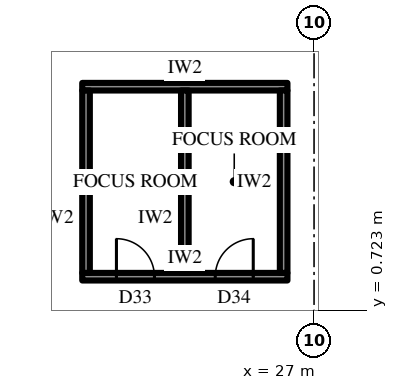
"""IFC4 building model, lengths in metres.
Left out: names, types, materials, properties, quantities, classifications, styles, units other than length and angle.
Written with IfcOpenShell. Run it as: python <this file> out.ifc"""

import sys

from ifc_helpers import new_model, si_unit, direction, frame, frame_2d, origin, place, context, subcontext, project, spatial, rectangle, extrude, element, fill, save


model = new_model("IFC4")
c1 = context("Model", 3, precision=1e-05, world=origin(), true_north=direction((0.0, 1.0)))
c2 = subcontext(c1, "Body", "Model", "MODEL_VIEW")
j1 = project(units=[si_unit("LENGTHUNIT", "METRE"), si_unit("PLANEANGLEUNIT", "RADIAN")], contexts=[c1])
p1 = place(None, origin())
s1 = spatial("IfcSite", under=j1, at=p1, CompositionType="ELEMENT")
p2 = place(p1, origin())
s2 = spatial("IfcBuilding", under=s1, at=p2, CompositionType="ELEMENT")
p3 = place(p2, frame((0.0, 0.0, 157.3)))
s3 = spatial("IfcBuildingStorey", under=s2, at=p3, CompositionType="ELEMENT", Elevation=157.3)
p4 = place(p3, frame((20.9, 1.6, 0.0), z_axis=(0.0, 0.0, 1.0), x_axis=(1.0, 0.0, 0.0)))
e1 = element("IfcWall", 1, at=p4, inside=s3, PredefinedType="PARTITIONING", context=c2, shape_type="SweptSolid", body=[
    extrude(rectangle(XDim=5.4, YDim=0.2, at=frame_2d((2.7, 0.0))), origin(), (0.0, 0.0, 1.0), 4.0),
])
p5 = place(p4, frame((0.9, 0.0, 0.0)))
e2 = element("IfcOpeningElement", 2, at=p5, cuts=e1, PredefinedType="OPENING", context=c2, shape_type="SweptSolid", body=[
    extrude(rectangle(XDim=1.0, YDim=2.2, at=frame_2d((0.5, 1.1))), frame((0.0, 0.11, 0.0), z_axis=(0.0, -1.0, 0.0), x_axis=(1.0, 0.0, 0.0)), (0.0, 0.0, 1.0), 0.22),
])
p6 = place(p4, frame((3.5, 0.0, 0.0)))
e3 = element("IfcOpeningElement", 3, at=p6, cuts=e1, PredefinedType="OPENING", context=c2, shape_type="SweptSolid", body=[
    extrude(rectangle(XDim=1.0, YDim=2.2, at=frame_2d((0.5, 1.1))), frame((0.0, 0.11, 0.0), z_axis=(0.0, -1.0, 0.0), x_axis=(1.0, 0.0, 0.0)), (0.0, 0.0, 1.0), 0.22),
])
p7 = place(p3, frame((20.9, 6.6, 0.0), z_axis=(0.0, 0.0, 1.0), x_axis=(1.0, 0.0, 0.0)))
e4 = element("IfcWall", 4, at=p7, inside=s3, PredefinedType="PARTITIONING", context=c2, shape_type="SweptSolid", body=[
    extrude(rectangle(XDim=5.4, YDim=0.2, at=frame_2d((2.7, 0.0))), origin(), (0.0, 0.0, 1.0), 4.0),
])
for number, where, z_axis, x_axis in (
    (5, (21.0, 1.7, 0.0), (0.0, 0.0, 1.0), (0.0, 1.0, 0.0)),
    (6, (23.6, 1.7, 0.0), (0.0, 0.0, 1.0), (0.0, 1.0, 0.0)),
    (7, (26.2, 1.7, 0.0), (0.0, 0.0, 1.0), (0.0, 1.0, 0.0)),
):
    element("IfcWall", number, at=place(p3, frame(where, z_axis=z_axis, x_axis=x_axis)), inside=s3, PredefinedType="PARTITIONING", context=c2, shape_type="SweptSolid", body=[
        extrude(rectangle(XDim=4.8, YDim=0.2, at=frame_2d((2.4, 0.0))), origin(), (0.0, 0.0, 1.0), 4.0),
    ])
p8 = place(p5, origin())
e8 = element("IfcDoor", 8, at=p8, inside=s3, OperationType="SINGLE_SWING_RIGHT", PredefinedType="DOOR", context=c2, shape_type="SweptSolid", body=[
    extrude(rectangle(XDim=1.0, YDim=2.2, at=frame_2d((0.5, 1.1))), frame((0.0, 0.025, 0.0), z_axis=(0.0, -1.0, 0.0), x_axis=(1.0, 0.0, 0.0)), (0.0, 0.0, 1.0), 0.05),
])
fill(e2, e8)
p9 = place(p6, origin())
e9 = element("IfcDoor", 9, at=p9, inside=s3, OperationType="SINGLE_SWING_LEFT", PredefinedType="DOOR", context=c2, shape_type="SweptSolid", body=[
    extrude(rectangle(XDim=1.0, YDim=2.2, at=frame_2d((0.5, 1.1))), frame((0.0, 0.025, 0.0), z_axis=(0.0, -1.0, 0.0), x_axis=(1.0, 0.0, 0.0)), (0.0, 0.0, 1.0), 0.05),
])
fill(e3, e9)
save(model, sys.argv[1])
